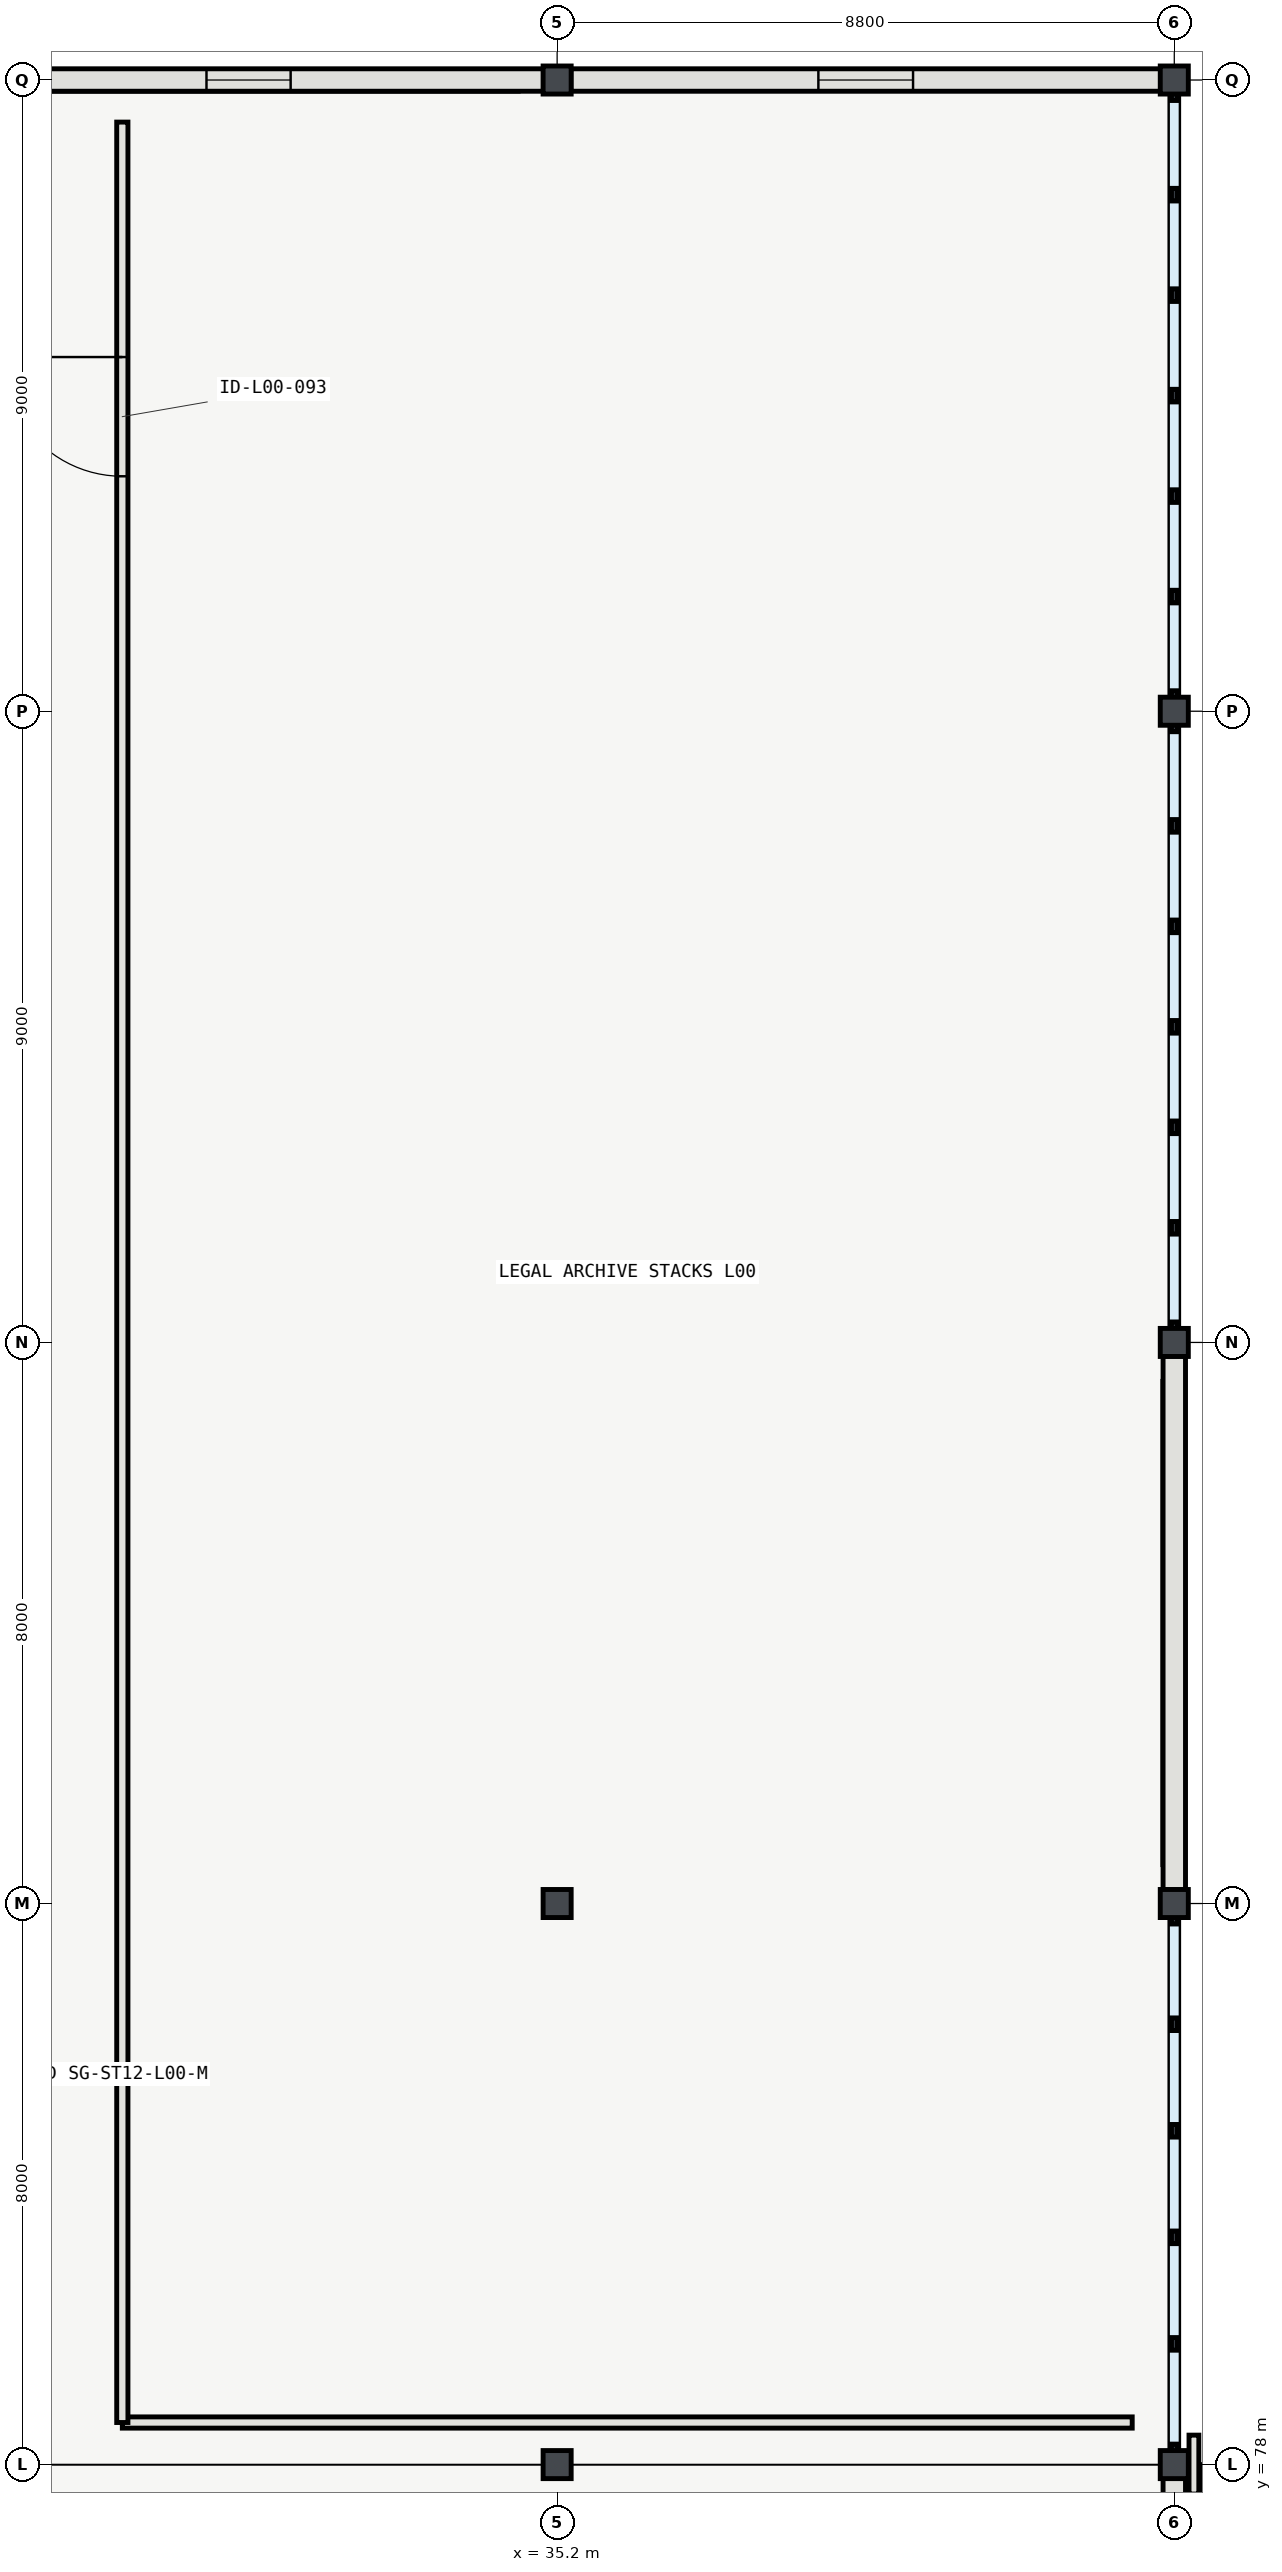
"""IFC4 building model, lengths in metres.
Left out: names, types, materials, properties, quantities, classifications, styles, units other than length and angle.
Written with IfcOpenShell. Run it as: python <this file> out.ifc"""

import sys

from ifc_helpers import new_model, si_unit, direction, frame, frame_2d, origin, origin_2d, place, context, subcontext, project, spatial, rectangle, i_section, extrude, element, fill, save


model = new_model("IFC4")
c1 = context("Model", 3, precision=1e-05, world=origin(), true_north=direction((0.0, 1.0)))
c2 = subcontext(c1, "Body", "Model", "MODEL_VIEW")
j1 = project(units=[si_unit("LENGTHUNIT", "METRE"), si_unit("PLANEANGLEUNIT", "RADIAN")], contexts=[c1])
p1 = place(None, origin())
s1 = spatial("IfcSite", under=j1, at=p1, CompositionType="ELEMENT")
p2 = place(p1, origin())
s2 = spatial("IfcBuilding", under=s1, at=p2, CompositionType="ELEMENT")
p3 = place(p2, origin())
s3 = spatial("IfcBuildingStorey", under=s2, at=p3, CompositionType="ELEMENT", Elevation=0.0)
for number, where, z_axis, x_axis in (
    (1, (35.2, 78.0, 0.0), (0.0, 0.0, 1.0), (1.0, 0.0, 0.0)),
    (2, (35.2, 86.0, 0.0), (0.0, 0.0, 1.0), (1.0, 0.0, 0.0)),
    (3, (35.2, 112.0, 0.0), (0.0, 0.0, 1.0), (1.0, 0.0, 0.0)),
    (4, (44.0, 78.0, 0.0), (0.0, 0.0, 1.0), (1.0, 0.0, 0.0)),
    (5, (44.0, 86.0, 0.0), (0.0, 0.0, 1.0), (1.0, 0.0, 0.0)),
    (6, (44.0, 94.0, 0.0), (0.0, 0.0, 1.0), (1.0, 0.0, 0.0)),
    (7, (44.0, 103.0, 0.0), (0.0, 0.0, 1.0), (1.0, 0.0, 0.0)),
    (8, (44.0, 112.0, 0.0), (0.0, 0.0, 1.0), (1.0, 0.0, 0.0)),
):
    element("IfcColumn", number, at=place(p3, frame(where, z_axis=z_axis, x_axis=x_axis)), inside=s3, PredefinedType="COLUMN", context=c2, shape_type="SweptSolid", body=[
        extrude(i_section(OverallWidth=0.4, OverallDepth=0.4, WebThickness=0.013, FlangeThickness=0.021, FilletRadius=0.022, at=origin_2d()), origin(), (0.0, 0.0, 1.0), 5.4),
    ])
p4 = place(p3, frame((35.004, 112.0, 0.0), z_axis=(0.0, 0.0, 1.0), x_axis=(-1.0, 0.0, 0.0)))
e9 = element("IfcWall", 9, at=p4, inside=s3, PredefinedType="SOLIDWALL", context=c2, shape_type="SweptSolid", body=[
    extrude(rectangle(XDim=8.408, YDim=0.32, at=frame_2d((4.204, 0.0))), origin(), (0.0, 0.0, 1.0), 4.615),
])
p5 = place(p4, frame((3.604, 0.0, 0.95)))
e10 = element("IfcOpeningElement", 10, at=p5, cuts=e9, PredefinedType="OPENING", context=c2, shape_type="SweptSolid", body=[
    extrude(rectangle(XDim=1.2, YDim=1.8, at=frame_2d((0.6, 0.9))), frame((0.0, 0.17, 0.0), z_axis=(0.0, -1.0, 0.0), x_axis=(1.0, 0.0, 0.0)), (0.0, 0.0, 1.0), 0.34),
])
p6 = place(p3, frame((43.804, 112.0, 0.0), z_axis=(0.0, 0.0, 1.0), x_axis=(-1.0, 0.0, 0.0)))
e11 = element("IfcWall", 11, at=p6, inside=s3, PredefinedType="SOLIDWALL", context=c2, shape_type="SweptSolid", body=[
    extrude(rectangle(XDim=8.408, YDim=0.32, at=frame_2d((4.204, 0.0))), origin(), (0.0, 0.0, 1.0), 4.615),
])
p7 = place(p6, frame((3.529, 0.0, 0.95)))
e12 = element("IfcOpeningElement", 12, at=p7, cuts=e11, PredefinedType="OPENING", context=c2, shape_type="SweptSolid", body=[
    extrude(rectangle(XDim=1.35, YDim=1.8, at=frame_2d((0.675, 0.9))), frame((0.0, 0.17, 0.0), z_axis=(0.0, -1.0, 0.0), x_axis=(1.0, 0.0, 0.0)), (0.0, 0.0, 1.0), 0.34),
])
p8 = place(p3, frame((44.0, 86.196, 0.0), z_axis=(0.0, 0.0, 1.0), x_axis=(0.0, 1.0, 0.0)))
e13 = element("IfcWall", 13, at=p8, inside=s3, PredefinedType="SOLIDWALL", context=c2, shape_type="SweptSolid", body=[
    extrude(rectangle(XDim=7.608, YDim=0.32, at=frame_2d((3.804, 0.0))), origin(), (0.0, 0.0, 1.0), 4.503),
])
p9 = place(p3, frame((44.0, 70.321, 0.0), z_axis=(0.0, 0.0, 1.0), x_axis=(0.0, 1.0, 0.0)))
e14 = element("IfcWall", 14, at=p9, inside=s3, PredefinedType="SOLIDWALL", context=c2, shape_type="SweptSolid", body=[
    extrude(rectangle(XDim=7.483, YDim=0.32, at=frame_2d((3.741, 0.0))), origin(), (0.0, 0.0, 1.0), 4.523),
])
p10 = place(p9, frame((2.479, 0.0, 0.95)))
e15 = element("IfcOpeningElement", 15, at=p10, cuts=e14, PredefinedType="OPENING", context=c2, shape_type="SweptSolid", body=[
    extrude(rectangle(XDim=2.4, YDim=1.5, at=frame_2d((1.2, 0.75))), frame((0.0, 0.17, 0.0), z_axis=(0.0, -1.0, 0.0), x_axis=(1.0, 0.0, 0.0)), (0.0, 0.0, 1.0), 0.34),
])
p11 = place(p3, frame((44.44, 30.0, 0.0), z_axis=(0.0, 0.0, 1.0), x_axis=(0.0, 1.0, 0.0)))
e16 = element("IfcWall", 16, at=p11, inside=s3, PredefinedType="SOLIDWALL", context=c2, shape_type="SweptSolid", body=[
    extrude(rectangle(XDim=48.0, YDim=0.16, at=frame_2d((24.0, 0.0))), origin(), (0.0, 0.0, 1.0), 0.58),
])
p12 = place(p3, frame((44.28, 77.58, 0.0), z_axis=(0.0, 0.0, 1.0), x_axis=(0.0, 1.0, 0.0)))
e17 = element("IfcWall", 17, at=p12, inside=s3, PredefinedType="SOLIDWALL", context=c2, shape_type="SweptSolid", body=[
    extrude(rectangle(XDim=0.84, YDim=0.14, at=frame_2d((0.42, 0.0))), origin(), (0.0, 0.0, 1.0), 5.14),
])
p13 = place(p3, frame((29.0, 78.6, 0.0), z_axis=(0.0, 0.0, 1.0), x_axis=(1.0, 0.0, 0.0)))
e18 = element("IfcWall", 18, at=p13, inside=s3, PredefinedType="PARTITIONING", context=c2, shape_type="SweptSolid", body=[
    extrude(rectangle(XDim=14.4, YDim=0.16, at=frame_2d((7.2, 0.0))), origin(), (0.0, 0.0, 1.0), 5.12),
])
p14 = place(p3, frame((29.0, 111.4, 0.0), z_axis=(0.0, 0.0, 1.0), x_axis=(0.0, -1.0, 0.0)))
e19 = element("IfcWall", 19, at=p14, inside=s3, PredefinedType="PARTITIONING", context=c2, shape_type="SweptSolid", body=[
    extrude(rectangle(XDim=32.8, YDim=0.16, at=frame_2d((16.4, 0.0))), origin(), (0.0, 0.0, 1.0), 5.12),
])
p15 = place(p14, frame((3.35, 0.0, 0.0)))
e20 = element("IfcOpeningElement", 20, at=p15, cuts=e19, PredefinedType="OPENING", context=c2, shape_type="SweptSolid", body=[
    extrude(rectangle(XDim=1.7, YDim=2.3, at=frame_2d((0.85, 1.15))), frame((0.0, 0.09, 0.0), z_axis=(0.0, -1.0, 0.0), x_axis=(1.0, 0.0, 0.0)), (0.0, 0.0, 1.0), 0.18),
])
p16 = place(p5, origin())
e21 = element("IfcWindow", 21, at=p16, inside=s3, PartitioningType="SINGLE_PANEL", PredefinedType="WINDOW", context=c2, shape_type="SweptSolid", body=[
    extrude(rectangle(XDim=1.2, YDim=1.8, at=frame_2d((0.6, 0.9))), frame((0.0, 0.03, 0.0), z_axis=(0.0, -1.0, 0.0), x_axis=(1.0, 0.0, 0.0)), (0.0, 0.0, 1.0), 0.06),
])
fill(e10, e21)
p17 = place(p7, origin())
e22 = element("IfcWindow", 22, at=p17, inside=s3, PartitioningType="SINGLE_PANEL", PredefinedType="WINDOW", context=c2, shape_type="SweptSolid", body=[
    extrude(rectangle(XDim=1.35, YDim=1.8, at=frame_2d((0.675, 0.9))), frame((0.0, 0.03, 0.0), z_axis=(0.0, -1.0, 0.0), x_axis=(1.0, 0.0, 0.0)), (0.0, 0.0, 1.0), 0.06),
])
fill(e12, e22)
p18 = place(p15, origin())
e23 = element("IfcDoor", 23, at=p18, inside=s3, OperationType="DOUBLE_DOOR_SINGLE_SWING", PredefinedType="DOOR", context=c2, shape_type="SweptSolid", body=[
    extrude(rectangle(XDim=1.7, YDim=2.3, at=frame_2d((0.85, 1.15))), frame((0.0, 0.025, 0.0), z_axis=(0.0, -1.0, 0.0), x_axis=(1.0, 0.0, 0.0)), (0.0, 0.0, 1.0), 0.05),
])
fill(e20, e23)
save(model, sys.argv[1])
